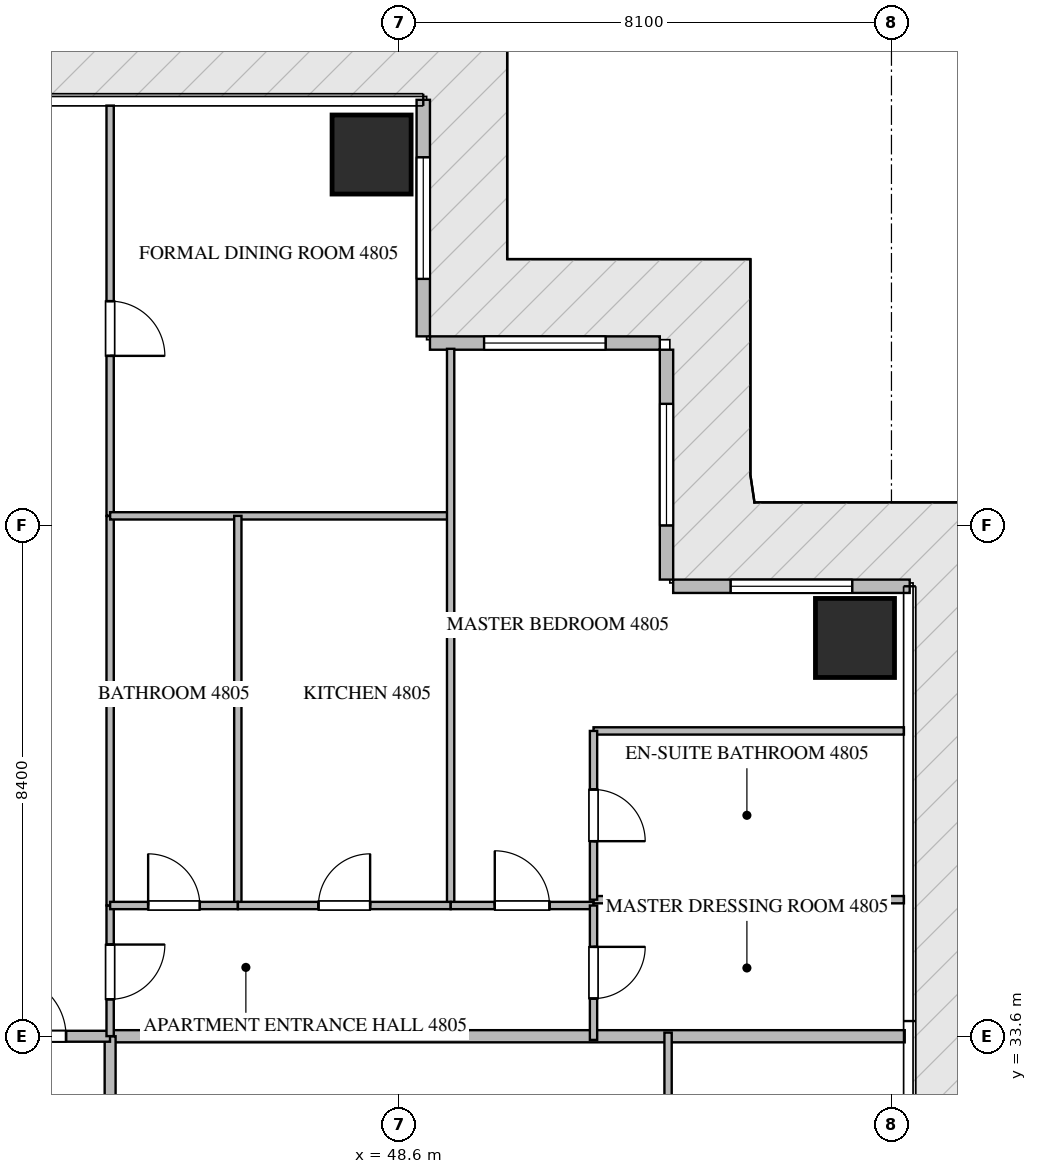
"""IFC4 building model, lengths in metres.
Left out: names, types, materials, properties, quantities, classifications, styles, units other than length and angle.
Written with IfcOpenShell. Run it as: python <this file> out.ifc"""

import sys

from ifc_helpers import new_model, si_unit, direction, frame, frame_2d, origin, origin_2d, place, context, subcontext, project, spatial, rectangle, extrude, source, transform, mapped, element, fill, save


model = new_model("IFC4")
c1 = context("Model", 3, precision=1e-05, world=origin(), true_north=direction((0.0, 1.0)))
c2 = subcontext(c1, "Body", "Model", "MODEL_VIEW")
j1 = project(units=[si_unit("LENGTHUNIT", "METRE"), si_unit("PLANEANGLEUNIT", "RADIAN")], contexts=[c1])
p1 = place(None, origin())
s1 = spatial("IfcSite", under=j1, at=p1, CompositionType="ELEMENT")
p2 = place(p1, origin())
s2 = spatial("IfcBuilding", under=s1, at=p2, CompositionType="ELEMENT")
p3 = place(p2, frame((0.0, 0.0, 191.4)))
s3 = spatial("IfcBuildingStorey", under=s2, at=p3, CompositionType="ELEMENT", Elevation=191.4)
m1 = source(origin(), c2, "Body", "SweptSolid", [
    extrude(rectangle(XDim=1.3, YDim=1.3, at=origin_2d()), origin(), (0.0, 0.0, 1.0), 3.75),
])
for number, where, z_axis, x_axis in (
    (1, (48.15, 48.1, -0.26), (0.0, 0.0, 1.0), (1.0, 0.0, 0.0)),
    (2, (56.1, 40.15, -0.26), (0.0, 0.0, 1.0), (1.0, 0.0, 0.0)),
):
    element("IfcColumn", number, at=place(p3, frame(where, z_axis=z_axis, x_axis=x_axis)), inside=s3, PredefinedType="COLUMN", context=c2, shape_type="MappedRepresentation", body=[
        mapped(m1, transform((0.0, 0.0, 0.0), scale=1.0)),
    ])
p4 = place(p3, frame((57.0, 41.0, 0.0), z_axis=(0.0, 0.0, 1.0), x_axis=(-1.0, 0.0, 0.0)))
e3 = element("IfcWall", 3, at=p4, inside=s3, PredefinedType="ELEMENTEDWALL", context=c2, shape_type="SweptSolid", body=[
    extrude(rectangle(XDim=3.89, YDim=0.22, at=frame_2d((1.945, 0.0))), origin(), (0.0, 0.0, 1.0), 3.475),
])
p5 = place(p4, frame((0.945, 0.0, 0.65)))
e4 = element("IfcOpeningElement", 4, at=p5, cuts=e3, PredefinedType="OPENING", context=c2, shape_type="SweptSolid", body=[
    extrude(rectangle(XDim=2.0, YDim=2.2, at=frame_2d((1.0, 1.1))), frame((0.0, 0.12, 0.0), z_axis=(0.0, -1.0, 0.0), x_axis=(1.0, 0.0, 0.0)), (0.0, 0.0, 1.0), 0.24),
])
p6 = place(p3, frame((53.0, 41.11, 0.0), z_axis=(0.0, 0.0, 1.0), x_axis=(0.0, 1.0, 0.0)))
e5 = element("IfcWall", 5, at=p6, inside=s3, PredefinedType="ELEMENTEDWALL", context=c2, shape_type="SweptSolid", body=[
    extrude(rectangle(XDim=3.78, YDim=0.22, at=frame_2d((1.89, 0.0))), origin(), (0.0, 0.0, 1.0), 3.475),
])
p7 = place(p6, frame((0.89, 0.0, 0.65)))
e6 = element("IfcOpeningElement", 6, at=p7, cuts=e5, PredefinedType="OPENING", context=c2, shape_type="SweptSolid", body=[
    extrude(rectangle(XDim=2.0, YDim=2.2, at=frame_2d((1.0, 1.1))), frame((0.0, 0.12, 0.0), z_axis=(0.0, -1.0, 0.0), x_axis=(1.0, 0.0, 0.0)), (0.0, 0.0, 1.0), 0.24),
])
p8 = place(p3, frame((52.89, 45.0, 0.0), z_axis=(0.0, 0.0, 1.0), x_axis=(-1.0, 0.0, 0.0)))
e7 = element("IfcWall", 7, at=p8, inside=s3, PredefinedType="ELEMENTEDWALL", context=c2, shape_type="SweptSolid", body=[
    extrude(rectangle(XDim=3.78, YDim=0.22, at=frame_2d((1.89, 0.0))), origin(), (0.0, 0.0, 1.0), 3.475),
])
p9 = place(p8, frame((0.89, 0.0, 0.65)))
e8 = element("IfcOpeningElement", 8, at=p9, cuts=e7, PredefinedType="OPENING", context=c2, shape_type="SweptSolid", body=[
    extrude(rectangle(XDim=2.0, YDim=2.2, at=frame_2d((1.0, 1.1))), frame((0.0, 0.12, 0.0), z_axis=(0.0, -1.0, 0.0), x_axis=(1.0, 0.0, 0.0)), (0.0, 0.0, 1.0), 0.24),
])
p10 = place(p3, frame((49.0, 45.11, 0.0), z_axis=(0.0, 0.0, 1.0), x_axis=(0.0, 1.0, 0.0)))
e9 = element("IfcWall", 9, at=p10, inside=s3, PredefinedType="ELEMENTEDWALL", context=c2, shape_type="SweptSolid", body=[
    extrude(rectangle(XDim=3.89, YDim=0.22, at=frame_2d((1.945, 0.0))), origin(), (0.0, 0.0, 1.0), 3.475),
])
p11 = place(p10, frame((0.945, 0.0, 0.65)))
e10 = element("IfcOpeningElement", 10, at=p11, cuts=e9, PredefinedType="OPENING", context=c2, shape_type="SweptSolid", body=[
    extrude(rectangle(XDim=2.0, YDim=2.2, at=frame_2d((1.0, 1.1))), frame((0.0, 0.12, 0.0), z_axis=(0.0, -1.0, 0.0), x_axis=(1.0, 0.0, 0.0)), (0.0, 0.0, 1.0), 0.24),
])
p12 = place(p3, frame((43.85, 33.6, 0.0), z_axis=(0.0, 0.0, 1.0), x_axis=(1.0, 0.0, 0.0)))
e11 = element("IfcWall", 11, at=p12, inside=s3, PredefinedType="PARTITIONING", context=c2, shape_type="SweptSolid", body=[
    extrude(rectangle(XDim=13.068, YDim=0.2, at=frame_2d((6.534, 0.0))), origin(), (0.0, 0.0, 1.0), 3.49),
])
p13 = place(p3, frame((43.85, 14.9, 0.0), z_axis=(0.0, 0.0, 1.0), x_axis=(0.0, 1.0, 0.0)))
e12 = element("IfcWall", 12, at=p13, inside=s3, PredefinedType="PARTITIONING", context=c2, shape_type="SweptSolid", body=[
    extrude(rectangle(XDim=18.7, YDim=0.18, at=frame_2d((9.35, 0.0))), origin(), (0.0, 0.0, 1.0), 3.49),
])
p14 = place(p13, frame((1.805, 0.0, 0.0)))
e13 = element("IfcOpeningElement", 13, at=p14, cuts=e12, PredefinedType="OPENING", context=c2, shape_type="SweptSolid", body=[
    extrude(rectangle(XDim=1.0, YDim=2.15, at=frame_2d((0.5, 1.075))), frame((0.0, 0.1, 0.0), z_axis=(0.0, -1.0, 0.0), x_axis=(1.0, 0.0, 0.0)), (0.0, 0.0, 1.0), 0.2),
])
p15 = place(p3, frame((41.402, 33.6, 0.0), z_axis=(0.0, 0.0, 1.0), x_axis=(1.0, 0.0, 0.0)))
e14 = element("IfcWall", 14, at=p15, inside=s3, PredefinedType="PARTITIONING", context=c2, shape_type="SweptSolid", body=[
    extrude(rectangle(XDim=2.446, YDim=0.18, at=frame_2d((1.223, 0.0))), origin(), (0.0, 0.0, 1.0), 3.49),
])
p16 = place(p15, frame((0.723, 0.0, 0.0)))
e15 = element("IfcOpeningElement", 15, at=p16, cuts=e14, PredefinedType="OPENING", context=c2, shape_type="SweptSolid", body=[
    extrude(rectangle(XDim=1.0, YDim=2.15, at=frame_2d((0.5, 1.075))), frame((0.0, 0.1, 0.0), z_axis=(0.0, -1.0, 0.0), x_axis=(1.0, 0.0, 0.0)), (0.0, 0.0, 1.0), 0.2),
])
p17 = place(p3, frame((43.85, 35.75, 0.0), z_axis=(0.0, 0.0, 1.0), x_axis=(0.0, -1.0, 0.0)))
e16 = element("IfcWall", 16, at=p17, inside=s3, PredefinedType="PARTITIONING", context=c2, shape_type="SweptSolid", body=[
    extrude(rectangle(XDim=2.148, YDim=0.12, at=frame_2d((1.074, 0.0))), origin(), (0.0, 0.0, 1.0), 3.49),
])
p18 = place(p17, frame((0.642, 0.0, 0.0)))
e17 = element("IfcOpeningElement", 17, at=p18, cuts=e16, PredefinedType="OPENING", context=c2, shape_type="SweptSolid", body=[
    extrude(rectangle(XDim=0.9, YDim=2.1, at=frame_2d((0.45, 1.05))), frame((0.0, 0.07, 0.0), z_axis=(0.0, -1.0, 0.0), x_axis=(1.0, 0.0, 0.0)), (0.0, 0.0, 1.0), 0.14),
])
p19 = place(p3, frame((43.85, 48.905, 0.0), z_axis=(0.0, 0.0, 1.0), x_axis=(0.0, -1.0, 0.0)))
e18 = element("IfcWall", 18, at=p19, inside=s3, PredefinedType="PARTITIONING", context=c2, shape_type="SweptSolid", body=[
    extrude(rectangle(XDim=6.747, YDim=0.12, at=frame_2d((3.374, 0.0))), origin(), (0.0, 0.0, 1.0), 3.49),
])
p20 = place(p19, frame((3.216, 0.0, 0.0)))
e19 = element("IfcOpeningElement", 19, at=p20, cuts=e18, PredefinedType="OPENING", context=c2, shape_type="SweptSolid", body=[
    extrude(rectangle(XDim=0.9, YDim=2.1, at=frame_2d((0.45, 1.05))), frame((0.0, 0.07, 0.0), z_axis=(0.0, -1.0, 0.0), x_axis=(1.0, 0.0, 0.0)), (0.0, 0.0, 1.0), 0.14),
])
p21 = place(p3, frame((43.85, 42.156, 0.0), z_axis=(0.0, 0.0, 1.0), x_axis=(0.0, -1.0, 0.0)))
e20 = element("IfcWall", 20, at=p21, inside=s3, PredefinedType="PARTITIONING", context=c2, shape_type="SweptSolid", body=[
    extrude(rectangle(XDim=6.404, YDim=0.12, at=frame_2d((3.202, 0.0))), origin(), (0.0, 0.0, 1.0), 3.49),
])
p22 = place(p3, frame((43.85, 42.158, 0.0), z_axis=(0.0, 0.0, 1.0), x_axis=(1.0, 0.0, 0.0)))
e21 = element("IfcWall", 21, at=p22, inside=s3, PredefinedType="PARTITIONING", context=c2, shape_type="SweptSolid", body=[
    extrude(rectangle(XDim=5.6, YDim=0.12, at=frame_2d((2.8, 0.0))), origin(), (0.0, 0.0, 1.0), 3.49),
])
p23 = place(p3, frame((49.45, 44.905, 0.0), z_axis=(0.0, 0.0, 1.0), x_axis=(0.0, -1.0, 0.0)))
e22 = element("IfcWall", 22, at=p23, inside=s3, PredefinedType="PARTITIONING", context=c2, shape_type="SweptSolid", body=[
    extrude(rectangle(XDim=9.155, YDim=0.12, at=frame_2d((4.578, 0.0))), origin(), (0.0, 0.0, 1.0), 3.49),
])
p24 = place(p3, frame((45.95, 42.158, 0.0), z_axis=(0.0, 0.0, 1.0), x_axis=(0.0, -1.0, 0.0)))
e23 = element("IfcWall", 23, at=p24, inside=s3, PredefinedType="PARTITIONING", context=c2, shape_type="SweptSolid", body=[
    extrude(rectangle(XDim=6.408, YDim=0.12, at=frame_2d((3.204, 0.0))), origin(), (0.0, 0.0, 1.0), 3.49),
])
p25 = place(p3, frame((43.85, 35.75, 0.0), z_axis=(0.0, 0.0, 1.0), x_axis=(1.0, 0.0, 0.0)))
e24 = element("IfcWall", 24, at=p25, inside=s3, PredefinedType="PARTITIONING", context=c2, shape_type="SweptSolid", body=[
    extrude(rectangle(XDim=2.1, YDim=0.12, at=frame_2d((1.05, 0.0))), origin(), (0.0, 0.0, 1.0), 3.49),
])
p26 = place(p25, frame((0.625, 0.0, 0.0)))
e25 = element("IfcOpeningElement", 25, at=p26, cuts=e24, PredefinedType="OPENING", context=c2, shape_type="SweptSolid", body=[
    extrude(rectangle(XDim=0.85, YDim=2.1, at=frame_2d((0.425, 1.05))), frame((0.0, 0.07, 0.0), z_axis=(0.0, -1.0, 0.0), x_axis=(1.0, 0.0, 0.0)), (0.0, 0.0, 1.0), 0.14),
])
p27 = place(p3, frame((45.952, 35.75, 0.0), z_axis=(0.0, 0.0, 1.0), x_axis=(1.0, 0.0, 0.0)))
e26 = element("IfcWall", 26, at=p27, inside=s3, PredefinedType="PARTITIONING", context=c2, shape_type="SweptSolid", body=[
    extrude(rectangle(XDim=3.498, YDim=0.12, at=frame_2d((1.749, 0.0))), origin(), (0.0, 0.0, 1.0), 3.49),
])
p28 = place(p27, frame((1.324, 0.0, 0.0)))
e27 = element("IfcOpeningElement", 27, at=p28, cuts=e26, PredefinedType="OPENING", context=c2, shape_type="SweptSolid", body=[
    extrude(rectangle(XDim=0.85, YDim=2.1, at=frame_2d((0.425, 1.05))), frame((0.0, 0.07, 0.0), z_axis=(0.0, -1.0, 0.0), x_axis=(1.0, 0.0, 0.0)), (0.0, 0.0, 1.0), 0.14),
])
p29 = place(p3, frame((49.452, 35.75, 0.0), z_axis=(0.0, 0.0, 1.0), x_axis=(1.0, 0.0, 0.0)))
e28 = element("IfcWall", 28, at=p29, inside=s3, PredefinedType="PARTITIONING", context=c2, shape_type="SweptSolid", body=[
    extrude(rectangle(XDim=2.348, YDim=0.12, at=frame_2d((1.174, 0.0))), origin(), (0.0, 0.0, 1.0), 3.49),
])
p30 = place(p29, frame((0.724, 0.0, 0.0)))
e29 = element("IfcOpeningElement", 29, at=p30, cuts=e28, PredefinedType="OPENING", context=c2, shape_type="SweptSolid", body=[
    extrude(rectangle(XDim=0.9, YDim=2.1, at=frame_2d((0.45, 1.05))), frame((0.0, 0.07, 0.0), z_axis=(0.0, -1.0, 0.0), x_axis=(1.0, 0.0, 0.0)), (0.0, 0.0, 1.0), 0.14),
])
p31 = place(p3, frame((51.8, 38.621, 0.0), z_axis=(0.0, 0.0, 1.0), x_axis=(1.0, 0.0, 0.0)))
e30 = element("IfcWall", 30, at=p31, inside=s3, PredefinedType="PARTITIONING", context=c2, shape_type="SweptSolid", body=[
    extrude(rectangle(XDim=5.105, YDim=0.12, at=frame_2d((2.552, 0.0))), origin(), (0.0, 0.0, 1.0), 3.49),
])
p32 = place(p3, frame((51.802, 35.846, 0.0), z_axis=(0.0, 0.0, 1.0), x_axis=(1.0, 0.0, 0.0)))
e31 = element("IfcWall", 31, at=p32, inside=s3, PredefinedType="PARTITIONING", context=c2, shape_type="SweptSolid", body=[
    extrude(rectangle(XDim=5.103, YDim=0.12, at=frame_2d((2.552, 0.0))), origin(), (0.0, 0.0, 1.0), 3.49),
])
p33 = place(p3, frame((51.8, 38.621, 0.0), z_axis=(0.0, 0.0, 1.0), x_axis=(0.0, -1.0, 0.0)))
e32 = element("IfcWall", 32, at=p33, inside=s3, PredefinedType="PARTITIONING", context=c2, shape_type="SweptSolid", body=[
    extrude(rectangle(XDim=2.775, YDim=0.12, at=frame_2d((1.388, 0.0))), origin(), (0.0, 0.0, 1.0), 3.49),
])
p34 = place(p33, frame((0.963, 0.0, 0.0)))
e33 = element("IfcOpeningElement", 33, at=p34, cuts=e32, PredefinedType="OPENING", context=c2, shape_type="SweptSolid", body=[
    extrude(rectangle(XDim=0.85, YDim=2.1, at=frame_2d((0.425, 1.05))), frame((0.0, 0.07, 0.0), z_axis=(0.0, -1.0, 0.0), x_axis=(1.0, 0.0, 0.0)), (0.0, 0.0, 1.0), 0.14),
])
p35 = place(p3, frame((51.8, 35.75, 0.0), z_axis=(0.0, 0.0, 1.0), x_axis=(0.0, -1.0, 0.0)))
e34 = element("IfcWall", 34, at=p35, inside=s3, PredefinedType="PARTITIONING", context=c2, shape_type="SweptSolid", body=[
    extrude(rectangle(XDim=2.21, YDim=0.12, at=frame_2d((1.105, 0.0))), origin(), (0.0, 0.0, 1.0), 3.49),
])
p36 = place(p35, frame((0.68, 0.0, 0.0)))
e35 = element("IfcOpeningElement", 35, at=p36, cuts=e34, PredefinedType="OPENING", context=c2, shape_type="SweptSolid", body=[
    extrude(rectangle(XDim=0.85, YDim=2.1, at=frame_2d((0.425, 1.05))), frame((0.0, 0.07, 0.0), z_axis=(0.0, -1.0, 0.0), x_axis=(1.0, 0.0, 0.0)), (0.0, 0.0, 1.0), 0.14),
])
p37 = place(p3, frame((53.026, 22.6, 0.0), z_axis=(0.0, 0.0, 1.0), x_axis=(0.0, 1.0, 0.0)))
e36 = element("IfcWall", 36, at=p37, inside=s3, PredefinedType="PARTITIONING", context=c2, shape_type="SweptSolid", body=[
    extrude(rectangle(XDim=11.06, YDim=0.12, at=frame_2d((5.53, 0.0))), origin(), (0.0, 0.0, 1.0), 3.49),
])
m2 = source(origin(), c2, "Body", "SweptSolid", [
    extrude(rectangle(XDim=2.0, YDim=2.2, at=frame_2d((1.0, 1.1))), frame((0.0, 0.03, 0.0), z_axis=(0.0, -1.0, 0.0), x_axis=(1.0, 0.0, 0.0)), (0.0, 0.0, 1.0), 0.06),
])
p38 = place(p5, origin())
e37 = element("IfcWindow", 37, at=p38, inside=s3, PartitioningType="SINGLE_PANEL", PredefinedType="WINDOW", context=c2, shape_type="MappedRepresentation", body=[
    mapped(m2, transform((0.0, 0.0, 0.0), scale=1.0)),
])
fill(e4, e37)
p39 = place(p7, origin())
e38 = element("IfcWindow", 38, at=p39, inside=s3, PartitioningType="SINGLE_PANEL", PredefinedType="WINDOW", context=c2, shape_type="MappedRepresentation", body=[
    mapped(m2, transform((0.0, 0.0, 0.0), scale=1.0)),
])
fill(e6, e38)
p40 = place(p9, origin())
e39 = element("IfcWindow", 39, at=p40, inside=s3, PartitioningType="SINGLE_PANEL", PredefinedType="WINDOW", context=c2, shape_type="MappedRepresentation", body=[
    mapped(m2, transform((0.0, 0.0, 0.0), scale=1.0)),
])
fill(e8, e39)
p41 = place(p11, origin())
e40 = element("IfcWindow", 40, at=p41, inside=s3, PartitioningType="SINGLE_PANEL", PredefinedType="WINDOW", context=c2, shape_type="MappedRepresentation", body=[
    mapped(m2, transform((0.0, 0.0, 0.0), scale=1.0)),
])
fill(e10, e40)
m3 = source(origin(), c2, "Body", "SweptSolid", [
    extrude(rectangle(XDim=1.0, YDim=2.15, at=frame_2d((0.5, 1.075))), frame((0.0, 0.025, 0.0), z_axis=(0.0, -1.0, 0.0), x_axis=(1.0, 0.0, 0.0)), (0.0, 0.0, 1.0), 0.05),
])
p42 = place(p16, origin())
e41 = element("IfcDoor", 41, at=p42, inside=s3, OperationType="SINGLE_SWING_LEFT", PredefinedType="DOOR", context=c2, shape_type="MappedRepresentation", body=[
    mapped(m3, transform((0.0, 0.0, 0.0), scale=1.0)),
])
fill(e15, e41)
m4 = source(origin(), c2, "Body", "SweptSolid", [
    extrude(rectangle(XDim=0.9, YDim=2.1, at=frame_2d((0.45, 1.05))), frame((0.0, 0.025, 0.0), z_axis=(0.0, -1.0, 0.0), x_axis=(1.0, 0.0, 0.0)), (0.0, 0.0, 1.0), 0.05),
])
p43 = place(p18, origin())
e42 = element("IfcDoor", 42, at=p43, inside=s3, OperationType="SINGLE_SWING_LEFT", PredefinedType="DOOR", context=c2, shape_type="MappedRepresentation", body=[
    mapped(m4, transform((0.0, 0.0, 0.0), scale=1.0)),
])
fill(e17, e42)
p44 = place(p20, origin())
e43 = element("IfcDoor", 43, at=p44, inside=s3, OperationType="SINGLE_SWING_RIGHT", PredefinedType="DOOR", context=c2, shape_type="MappedRepresentation", body=[
    mapped(m4, transform((0.0, 0.0, 0.0), scale=1.0)),
])
fill(e19, e43)
m5 = source(origin(), c2, "Body", "SweptSolid", [
    extrude(rectangle(XDim=0.85, YDim=2.1, at=frame_2d((0.425, 1.05))), frame((0.0, 0.025, 0.0), z_axis=(0.0, -1.0, 0.0), x_axis=(1.0, 0.0, 0.0)), (0.0, 0.0, 1.0), 0.05),
])
p45 = place(p26, origin())
e44 = element("IfcDoor", 44, at=p45, inside=s3, OperationType="SINGLE_SWING_LEFT", PredefinedType="DOOR", context=c2, shape_type="MappedRepresentation", body=[
    mapped(m5, transform((0.0, 0.0, 0.0), scale=1.0)),
])
fill(e25, e44)
p46 = place(p28, origin())
e45 = element("IfcDoor", 45, at=p46, inside=s3, OperationType="SINGLE_SWING_RIGHT", PredefinedType="DOOR", context=c2, shape_type="MappedRepresentation", body=[
    mapped(m5, transform((0.0, 0.0, 0.0), scale=1.0)),
])
fill(e27, e45)
p47 = place(p30, origin())
e46 = element("IfcDoor", 46, at=p47, inside=s3, OperationType="SINGLE_SWING_LEFT", PredefinedType="DOOR", context=c2, shape_type="MappedRepresentation", body=[
    mapped(m4, transform((0.0, 0.0, 0.0), scale=1.0)),
])
fill(e29, e46)
p48 = place(p34, origin())
e47 = element("IfcDoor", 47, at=p48, inside=s3, OperationType="SINGLE_SWING_RIGHT", PredefinedType="DOOR", context=c2, shape_type="MappedRepresentation", body=[
    mapped(m5, transform((0.0, 0.0, 0.0), scale=1.0)),
])
fill(e33, e47)
p49 = place(p36, origin())
e48 = element("IfcDoor", 48, at=p49, inside=s3, OperationType="SINGLE_SWING_LEFT", PredefinedType="DOOR", context=c2, shape_type="MappedRepresentation", body=[
    mapped(m5, transform((0.0, 0.0, 0.0), scale=1.0)),
])
fill(e35, e48)
save(model, sys.argv[1])
